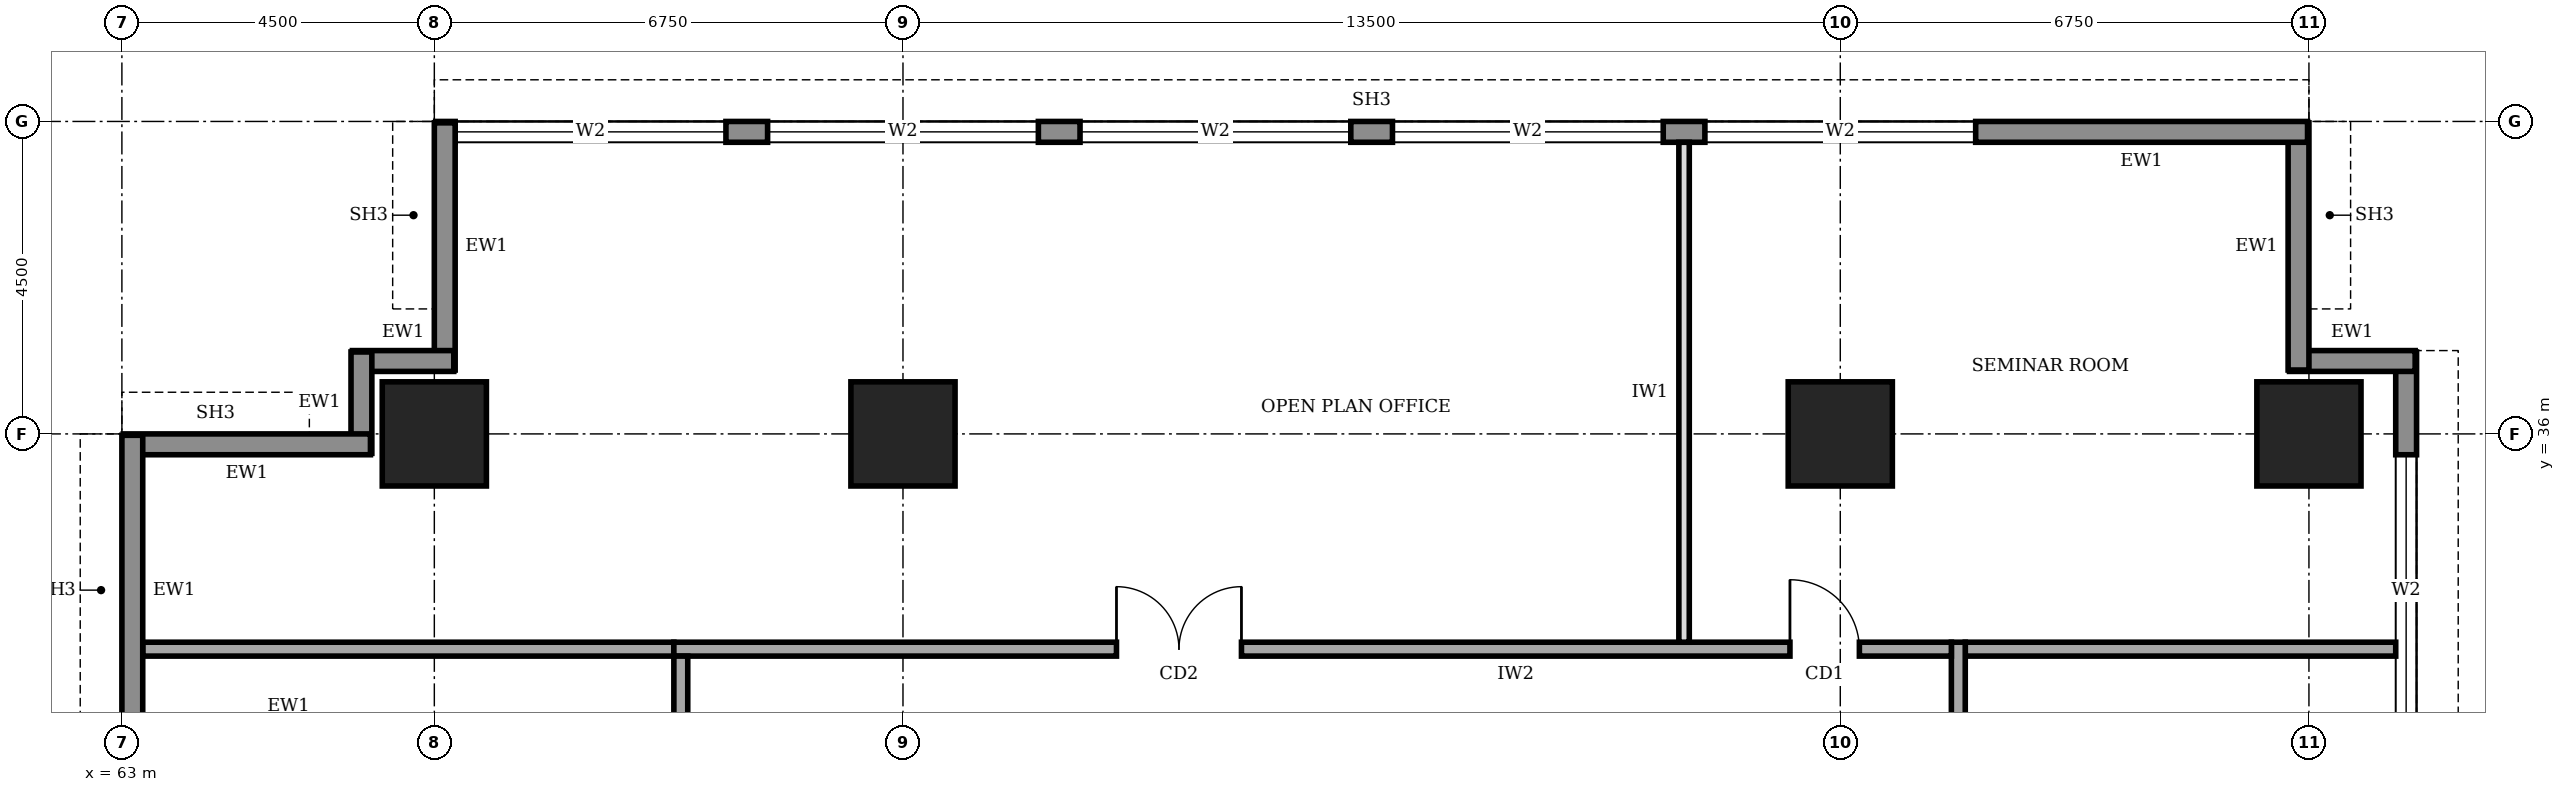
"""IFC4 building model, lengths in metres.
Left out: names, types, materials, properties, quantities, classifications, styles, units other than length and angle.
Written with IfcOpenShell. Run it as: python <this file> out.ifc"""

import sys

from ifc_helpers import new_model, si_unit, direction, frame, frame_2d, origin, origin_2d, place, context, subcontext, project, spatial, rectangle, extrude, element, fill, save


model = new_model("IFC4")
c1 = context("Model", 3, precision=1e-05, world=origin(), true_north=direction((0.0, 1.0)))
c2 = subcontext(c1, "Body", "Model", "MODEL_VIEW")
j1 = project(units=[si_unit("LENGTHUNIT", "METRE"), si_unit("PLANEANGLEUNIT", "RADIAN")], contexts=[c1])
p1 = place(None, origin())
s1 = spatial("IfcSite", under=j1, at=p1, CompositionType="ELEMENT")
p2 = place(p1, origin())
s2 = spatial("IfcBuilding", under=s1, at=p2, CompositionType="ELEMENT")
p3 = place(p2, frame((0.0, 0.0, 137.0)))
s3 = spatial("IfcBuildingStorey", under=s2, at=p3, CompositionType="ELEMENT", Elevation=137.0)
for number, where, z_axis, x_axis in (
    (1, (67.5, 36.0, 0.0), (0.0, 0.0, 1.0), (1.0, 0.0, 0.0)),
    (2, (74.25, 36.0, 0.0), (0.0, 0.0, 1.0), (1.0, 0.0, 0.0)),
    (3, (87.75, 36.0, 0.0), (0.0, 0.0, 1.0), (1.0, 0.0, 0.0)),
    (4, (94.5, 36.0, 0.0), (0.0, 0.0, 1.0), (1.0, 0.0, 0.0)),
):
    element("IfcColumn", number, at=place(p3, frame(where, z_axis=z_axis, x_axis=x_axis)), inside=s3, PredefinedType="COLUMN", context=c2, shape_type="SweptSolid", body=[
        extrude(rectangle(XDim=1.5, YDim=1.5, at=origin_2d()), origin(), (0.0, 0.0, 1.0), 4.0),
    ])
p4 = place(p3, frame((95.9, 3.32, 0.0), z_axis=(0.0, 0.0, 1.0), x_axis=(0.0, 1.0, 0.0)))
e5 = element("IfcWall", 5, at=p4, inside=s3, PredefinedType="STANDARD", context=c2, shape_type="SweptSolid", body=[
    extrude(rectangle(XDim=33.86, YDim=0.3, at=frame_2d((16.93, 0.0))), origin(), (0.0, 0.0, 1.0), 3.75),
])
p5 = place(p4, frame((1.48, 0.0, 0.6)))
e6 = element("IfcOpeningElement", 6, at=p5, cuts=e5, PredefinedType="OPENING", context=c2, shape_type="SweptSolid", body=[
    extrude(rectangle(XDim=3.9, YDim=2.6, at=frame_2d((1.95, 1.3))), frame((0.0, 0.16, 0.0), z_axis=(0.0, -1.0, 0.0), x_axis=(1.0, 0.0, 0.0)), (0.0, 0.0, 1.0), 0.32),
])
p6 = place(p4, frame((5.98, 0.0, 0.6)))
e7 = element("IfcOpeningElement", 7, at=p6, cuts=e5, PredefinedType="OPENING", context=c2, shape_type="SweptSolid", body=[
    extrude(rectangle(XDim=3.9, YDim=2.6, at=frame_2d((1.95, 1.3))), frame((0.0, 0.16, 0.0), z_axis=(0.0, -1.0, 0.0), x_axis=(1.0, 0.0, 0.0)), (0.0, 0.0, 1.0), 0.32),
])
p7 = place(p4, frame((10.48, 0.0, 0.6)))
e8 = element("IfcOpeningElement", 8, at=p7, cuts=e5, PredefinedType="OPENING", context=c2, shape_type="SweptSolid", body=[
    extrude(rectangle(XDim=3.9, YDim=2.6, at=frame_2d((1.95, 1.3))), frame((0.0, 0.16, 0.0), z_axis=(0.0, -1.0, 0.0), x_axis=(1.0, 0.0, 0.0)), (0.0, 0.0, 1.0), 0.32),
])
p8 = place(p4, frame((14.98, 0.0, 0.6)))
e9 = element("IfcOpeningElement", 9, at=p8, cuts=e5, PredefinedType="OPENING", context=c2, shape_type="SweptSolid", body=[
    extrude(rectangle(XDim=3.9, YDim=2.6, at=frame_2d((1.95, 1.3))), frame((0.0, 0.16, 0.0), z_axis=(0.0, -1.0, 0.0), x_axis=(1.0, 0.0, 0.0)), (0.0, 0.0, 1.0), 0.32),
])
p9 = place(p4, frame((19.48, 0.0, 0.6)))
e10 = element("IfcOpeningElement", 10, at=p9, cuts=e5, PredefinedType="OPENING", context=c2, shape_type="SweptSolid", body=[
    extrude(rectangle(XDim=3.9, YDim=2.6, at=frame_2d((1.95, 1.3))), frame((0.0, 0.16, 0.0), z_axis=(0.0, -1.0, 0.0), x_axis=(1.0, 0.0, 0.0)), (0.0, 0.0, 1.0), 0.32),
])
p10 = place(p4, frame((23.98, 0.0, 0.6)))
e11 = element("IfcOpeningElement", 11, at=p10, cuts=e5, PredefinedType="OPENING", context=c2, shape_type="SweptSolid", body=[
    extrude(rectangle(XDim=3.9, YDim=2.6, at=frame_2d((1.95, 1.3))), frame((0.0, 0.16, 0.0), z_axis=(0.0, -1.0, 0.0), x_axis=(1.0, 0.0, 0.0)), (0.0, 0.0, 1.0), 0.32),
])
p11 = place(p4, frame((28.48, 0.0, 0.6)))
e12 = element("IfcOpeningElement", 12, at=p11, cuts=e5, PredefinedType="OPENING", context=c2, shape_type="SweptSolid", body=[
    extrude(rectangle(XDim=3.9, YDim=2.6, at=frame_2d((1.95, 1.3))), frame((0.0, 0.16, 0.0), z_axis=(0.0, -1.0, 0.0), x_axis=(1.0, 0.0, 0.0)), (0.0, 0.0, 1.0), 0.32),
])
p12 = place(p3, frame((96.03, 37.05, 0.0), z_axis=(0.0, 0.0, 1.0), x_axis=(-1.0, 0.0, 0.0)))
e13 = element("IfcWall", 13, at=p12, inside=s3, PredefinedType="STANDARD", context=c2, shape_type="SweptSolid", body=[
    extrude(rectangle(XDim=1.81, YDim=0.3, at=frame_2d((0.905, 0.0))), origin(), (0.0, 0.0, 1.0), 3.75),
])
p13 = place(p3, frame((94.35, 36.92, 0.0), z_axis=(0.0, 0.0, 1.0), x_axis=(0.0, 1.0, 0.0)))
e14 = element("IfcWall", 14, at=p13, inside=s3, PredefinedType="STANDARD", context=c2, shape_type="SweptSolid", body=[
    extrude(rectangle(XDim=3.56, YDim=0.3, at=frame_2d((1.78, 0.0))), origin(), (0.0, 0.0, 1.0), 2.85),
])
p14 = place(p3, frame((94.48, 40.35, 0.0), z_axis=(0.0, 0.0, 1.0), x_axis=(-1.0, 0.0, 0.0)))
e15 = element("IfcWall", 15, at=p14, inside=s3, PredefinedType="STANDARD", context=c2, shape_type="SweptSolid", body=[
    extrude(rectangle(XDim=26.96, YDim=0.3, at=frame_2d((13.48, 0.0))), origin(), (0.0, 0.0, 1.0), 3.75),
])
p15 = place(p14, frame((22.78, 0.0, 0.6)))
e16 = element("IfcOpeningElement", 16, at=p15, cuts=e15, PredefinedType="OPENING", context=c2, shape_type="SweptSolid", body=[
    extrude(rectangle(XDim=3.9, YDim=2.6, at=frame_2d((1.95, 1.3))), frame((0.0, 0.16, 0.0), z_axis=(0.0, -1.0, 0.0), x_axis=(1.0, 0.0, 0.0)), (0.0, 0.0, 1.0), 0.32),
])
p16 = place(p14, frame((18.28, 0.0, 0.6)))
e17 = element("IfcOpeningElement", 17, at=p16, cuts=e15, PredefinedType="OPENING", context=c2, shape_type="SweptSolid", body=[
    extrude(rectangle(XDim=3.9, YDim=2.6, at=frame_2d((1.95, 1.3))), frame((0.0, 0.16, 0.0), z_axis=(0.0, -1.0, 0.0), x_axis=(1.0, 0.0, 0.0)), (0.0, 0.0, 1.0), 0.32),
])
p17 = place(p14, frame((13.78, 0.0, 0.6)))
e18 = element("IfcOpeningElement", 18, at=p17, cuts=e15, PredefinedType="OPENING", context=c2, shape_type="SweptSolid", body=[
    extrude(rectangle(XDim=3.9, YDim=2.6, at=frame_2d((1.95, 1.3))), frame((0.0, 0.16, 0.0), z_axis=(0.0, -1.0, 0.0), x_axis=(1.0, 0.0, 0.0)), (0.0, 0.0, 1.0), 0.32),
])
p18 = place(p14, frame((9.28, 0.0, 0.6)))
e19 = element("IfcOpeningElement", 19, at=p18, cuts=e15, PredefinedType="OPENING", context=c2, shape_type="SweptSolid", body=[
    extrude(rectangle(XDim=3.9, YDim=2.6, at=frame_2d((1.95, 1.3))), frame((0.0, 0.16, 0.0), z_axis=(0.0, -1.0, 0.0), x_axis=(1.0, 0.0, 0.0)), (0.0, 0.0, 1.0), 0.32),
])
p19 = place(p14, frame((4.78, 0.0, 0.6)))
e20 = element("IfcOpeningElement", 20, at=p19, cuts=e15, PredefinedType="OPENING", context=c2, shape_type="SweptSolid", body=[
    extrude(rectangle(XDim=3.9, YDim=2.6, at=frame_2d((1.95, 1.3))), frame((0.0, 0.16, 0.0), z_axis=(0.0, -1.0, 0.0), x_axis=(1.0, 0.0, 0.0)), (0.0, 0.0, 1.0), 0.32),
])
p20 = place(p3, frame((67.65, 40.48, 0.0), z_axis=(0.0, 0.0, 1.0), x_axis=(0.0, -1.0, 0.0)))
e21 = element("IfcWall", 21, at=p20, inside=s3, PredefinedType="STANDARD", context=c2, shape_type="SweptSolid", body=[
    extrude(rectangle(XDim=3.56, YDim=0.3, at=frame_2d((1.78, 0.0))), origin(), (0.0, 0.0, 1.0), 2.85),
])
for number, where, z_axis, x_axis in (
    (22, (67.78, 37.05, 0.0), (0.0, 0.0, 1.0), (-1.0, 0.0, 0.0)),
    (23, (66.45, 37.18, 0.0), (0.0, 0.0, 1.0), (0.0, -1.0, 0.0)),
):
    element("IfcWall", number, at=place(p3, frame(where, z_axis=z_axis, x_axis=x_axis)), inside=s3, PredefinedType="STANDARD", context=c2, shape_type="SweptSolid", body=[
        extrude(rectangle(XDim=1.46, YDim=0.3, at=frame_2d((0.73, 0.0))), origin(), (0.0, 0.0, 1.0), 3.75),
    ])
p21 = place(p3, frame((66.58, 35.85, 0.0), z_axis=(0.0, 0.0, 1.0), x_axis=(-1.0, 0.0, 0.0)))
e24 = element("IfcWall", 24, at=p21, inside=s3, PredefinedType="STANDARD", context=c2, shape_type="SweptSolid", body=[
    extrude(rectangle(XDim=3.56, YDim=0.3, at=frame_2d((1.78, 0.0))), origin(), (0.0, 0.0, 1.0), 2.85),
])
p22 = place(p3, frame((63.15, 35.98, 0.0), z_axis=(0.0, 0.0, 1.0), x_axis=(0.0, -1.0, 0.0)))
e25 = element("IfcWall", 25, at=p22, inside=s3, PredefinedType="STANDARD", context=c2, shape_type="SweptSolid", body=[
    extrude(rectangle(XDim=4.46, YDim=0.3, at=frame_2d((2.23, 0.0))), origin(), (0.0, 0.0, 1.0), 3.75),
])
p23 = place(p3, frame((89.45, 9.2, 0.0), z_axis=(0.0, 0.0, 1.0), x_axis=(0.0, 1.0, 0.0)))
e26 = element("IfcWall", 26, at=p23, inside=s3, PredefinedType="SOLIDWALL", context=c2, shape_type="SweptSolid", body=[
    extrude(rectangle(XDim=23.8, YDim=0.2, at=frame_2d((11.9, 0.0))), origin(), (0.0, 0.0, 1.0), 3.75),
])
p24 = place(p23, frame((1.55, 0.0, 0.0)))
e27 = element("IfcOpeningElement", 27, at=p24, cuts=e26, PredefinedType="OPENING", context=c2, shape_type="SweptSolid", body=[
    extrude(rectangle(XDim=1.0, YDim=2.1, at=frame_2d((0.5, 1.05))), frame((0.0, 0.11, 0.0), z_axis=(0.0, -1.0, 0.0), x_axis=(1.0, 0.0, 0.0)), (0.0, 0.0, 1.0), 0.22),
])
p25 = place(p23, frame((5.05, 0.0, 0.0)))
e28 = element("IfcOpeningElement", 28, at=p25, cuts=e26, PredefinedType="OPENING", context=c2, shape_type="SweptSolid", body=[
    extrude(rectangle(XDim=0.9, YDim=2.1, at=frame_2d((0.45, 1.05))), frame((0.0, 0.11, 0.0), z_axis=(0.0, -1.0, 0.0), x_axis=(1.0, 0.0, 0.0)), (0.0, 0.0, 1.0), 0.22),
])
p26 = place(p23, frame((8.25, 0.0, 0.0)))
e29 = element("IfcOpeningElement", 29, at=p26, cuts=e26, PredefinedType="OPENING", context=c2, shape_type="SweptSolid", body=[
    extrude(rectangle(XDim=0.9, YDim=2.1, at=frame_2d((0.45, 1.05))), frame((0.0, 0.11, 0.0), z_axis=(0.0, -1.0, 0.0), x_axis=(1.0, 0.0, 0.0)), (0.0, 0.0, 1.0), 0.22),
])
p27 = place(p23, frame((13.8, 0.0, 0.0)))
e30 = element("IfcOpeningElement", 30, at=p27, cuts=e26, PredefinedType="OPENING", context=c2, shape_type="SweptSolid", body=[
    extrude(rectangle(XDim=0.9, YDim=2.1, at=frame_2d((0.45, 1.05))), frame((0.0, 0.11, 0.0), z_axis=(0.0, -1.0, 0.0), x_axis=(1.0, 0.0, 0.0)), (0.0, 0.0, 1.0), 0.22),
])
p28 = place(p23, frame((16.3, 0.0, 0.0)))
e31 = element("IfcOpeningElement", 31, at=p28, cuts=e26, PredefinedType="OPENING", context=c2, shape_type="SweptSolid", body=[
    extrude(rectangle(XDim=1.0, YDim=2.1, at=frame_2d((0.5, 1.05))), frame((0.0, 0.11, 0.0), z_axis=(0.0, -1.0, 0.0), x_axis=(1.0, 0.0, 0.0)), (0.0, 0.0, 1.0), 0.22),
])
p29 = place(p23, frame((11.2, 0.0, 0.0)))
e32 = element("IfcOpeningElement", 32, at=p29, cuts=e26, PredefinedType="OPENING", context=c2, shape_type="SweptSolid", body=[
    extrude(rectangle(XDim=1.0, YDim=2.1, at=frame_2d((0.5, 1.05))), frame((0.0, 0.11, 0.0), z_axis=(0.0, -1.0, 0.0), x_axis=(1.0, 0.0, 0.0)), (0.0, 0.0, 1.0), 0.22),
])
p30 = place(p23, frame((20.3, 0.0, 0.0)))
e33 = element("IfcOpeningElement", 33, at=p30, cuts=e26, PredefinedType="OPENING", context=c2, shape_type="SweptSolid", body=[
    extrude(rectangle(XDim=1.0, YDim=2.1, at=frame_2d((0.5, 1.05))), frame((0.0, 0.11, 0.0), z_axis=(0.0, -1.0, 0.0), x_axis=(1.0, 0.0, 0.0)), (0.0, 0.0, 1.0), 0.22),
])
p31 = place(p3, frame((89.35, 32.9, 0.0), z_axis=(0.0, 0.0, 1.0), x_axis=(-1.0, 0.0, 0.0)))
e34 = element("IfcWall", 34, at=p31, inside=s3, PredefinedType="SOLIDWALL", context=c2, shape_type="SweptSolid", body=[
    extrude(rectangle(XDim=18.4, YDim=0.2, at=frame_2d((9.2, 0.0))), origin(), (0.0, 0.0, 1.0), 3.75),
])
p32 = place(p31, frame((10.225, 0.0, 0.0)))
e35 = element("IfcOpeningElement", 35, at=p32, cuts=e34, PredefinedType="OPENING", context=c2, shape_type="SweptSolid", body=[
    extrude(rectangle(XDim=1.8, YDim=2.1, at=frame_2d((0.9, 1.05))), frame((0.0, 0.11, 0.0), z_axis=(0.0, -1.0, 0.0), x_axis=(1.0, 0.0, 0.0)), (0.0, 0.0, 1.0), 0.22),
])
p33 = place(p31, frame((1.325, 0.0, 0.0)))
e36 = element("IfcOpeningElement", 36, at=p33, cuts=e34, PredefinedType="OPENING", context=c2, shape_type="SweptSolid", body=[
    extrude(rectangle(XDim=1.0, YDim=2.1, at=frame_2d((0.5, 1.05))), frame((0.0, 0.11, 0.0), z_axis=(0.0, -1.0, 0.0), x_axis=(1.0, 0.0, 0.0)), (0.0, 0.0, 1.0), 0.22),
])
p34 = place(p3, frame((71.05, 32.8, 0.0), z_axis=(0.0, 0.0, 1.0), x_axis=(0.0, -1.0, 0.0)))
e37 = element("IfcWall", 37, at=p34, inside=s3, PredefinedType="SOLIDWALL", context=c2, shape_type="SweptSolid", body=[
    extrude(rectangle(XDim=23.8, YDim=0.2, at=frame_2d((11.9, 0.0))), origin(), (0.0, 0.0, 1.0), 3.75),
])
p35 = place(p34, frame((18.8, 0.0, 0.0)))
e38 = element("IfcOpeningElement", 38, at=p35, cuts=e37, PredefinedType="OPENING", context=c2, shape_type="SweptSolid", body=[
    extrude(rectangle(XDim=1.0, YDim=2.1, at=frame_2d((0.5, 1.05))), frame((0.0, 0.11, 0.0), z_axis=(0.0, -1.0, 0.0), x_axis=(1.0, 0.0, 0.0)), (0.0, 0.0, 1.0), 0.22),
])
p36 = place(p34, frame((9.8, 0.0, 0.0)))
e39 = element("IfcOpeningElement", 39, at=p36, cuts=e37, PredefinedType="OPENING", context=c2, shape_type="SweptSolid", body=[
    extrude(rectangle(XDim=1.0, YDim=2.1, at=frame_2d((0.5, 1.05))), frame((0.0, 0.11, 0.0), z_axis=(0.0, -1.0, 0.0), x_axis=(1.0, 0.0, 0.0)), (0.0, 0.0, 1.0), 0.22),
])
p37 = place(p34, frame((2.3, 0.0, 0.0)))
e40 = element("IfcOpeningElement", 40, at=p37, cuts=e37, PredefinedType="OPENING", context=c2, shape_type="SweptSolid", body=[
    extrude(rectangle(XDim=1.0, YDim=2.1, at=frame_2d((0.5, 1.05))), frame((0.0, 0.11, 0.0), z_axis=(0.0, -1.0, 0.0), x_axis=(1.0, 0.0, 0.0)), (0.0, 0.0, 1.0), 0.22),
])
p38 = place(p3, frame((63.3, 32.9, 0.0), z_axis=(0.0, 0.0, 1.0), x_axis=(1.0, 0.0, 0.0)))
e41 = element("IfcWall", 41, at=p38, inside=s3, PredefinedType="SOLIDWALL", context=c2, shape_type="SweptSolid", body=[
    extrude(rectangle(XDim=7.65, YDim=0.2, at=frame_2d((3.825, 0.0))), origin(), (0.0, 0.0, 1.0), 3.75),
])
p39 = place(p3, frame((89.55, 32.9, 0.0), z_axis=(0.0, 0.0, 1.0), x_axis=(1.0, 0.0, 0.0)))
e42 = element("IfcWall", 42, at=p39, inside=s3, PredefinedType="SOLIDWALL", context=c2, shape_type="SweptSolid", body=[
    extrude(rectangle(XDim=6.2, YDim=0.2, at=frame_2d((3.1, 0.0))), origin(), (0.0, 0.0, 1.0), 3.75),
])
p40 = place(p3, frame((85.5, 33.0, 0.0), z_axis=(0.0, 0.0, 1.0), x_axis=(0.0, 1.0, 0.0)))
e43 = element("IfcWall", 43, at=p40, inside=s3, PredefinedType="PARTITIONING", context=c2, shape_type="SweptSolid", body=[
    extrude(rectangle(XDim=7.2, YDim=0.15, at=frame_2d((3.6, 0.0))), origin(), (0.0, 0.0, 1.0), 3.75),
])
p41 = place(p11, origin())
e44 = element("IfcWindow", 44, at=p41, inside=s3, PartitioningType="SINGLE_PANEL", PredefinedType="WINDOW", context=c2, shape_type="SweptSolid", body=[
    extrude(rectangle(XDim=3.9, YDim=2.6, at=frame_2d((1.95, 1.3))), frame((0.0, 0.03, 0.0), z_axis=(0.0, -1.0, 0.0), x_axis=(1.0, 0.0, 0.0)), (0.0, 0.0, 1.0), 0.06),
])
fill(e12, e44)
p42 = place(p15, origin())
e45 = element("IfcWindow", 45, at=p42, inside=s3, PartitioningType="SINGLE_PANEL", PredefinedType="WINDOW", context=c2, shape_type="SweptSolid", body=[
    extrude(rectangle(XDim=3.9, YDim=2.6, at=frame_2d((1.95, 1.3))), frame((0.0, 0.03, 0.0), z_axis=(0.0, -1.0, 0.0), x_axis=(1.0, 0.0, 0.0)), (0.0, 0.0, 1.0), 0.06),
])
fill(e16, e45)
p43 = place(p16, origin())
e46 = element("IfcWindow", 46, at=p43, inside=s3, PartitioningType="SINGLE_PANEL", PredefinedType="WINDOW", context=c2, shape_type="SweptSolid", body=[
    extrude(rectangle(XDim=3.9, YDim=2.6, at=frame_2d((1.95, 1.3))), frame((0.0, 0.03, 0.0), z_axis=(0.0, -1.0, 0.0), x_axis=(1.0, 0.0, 0.0)), (0.0, 0.0, 1.0), 0.06),
])
fill(e17, e46)
p44 = place(p17, origin())
e47 = element("IfcWindow", 47, at=p44, inside=s3, PartitioningType="SINGLE_PANEL", PredefinedType="WINDOW", context=c2, shape_type="SweptSolid", body=[
    extrude(rectangle(XDim=3.9, YDim=2.6, at=frame_2d((1.95, 1.3))), frame((0.0, 0.03, 0.0), z_axis=(0.0, -1.0, 0.0), x_axis=(1.0, 0.0, 0.0)), (0.0, 0.0, 1.0), 0.06),
])
fill(e18, e47)
p45 = place(p18, origin())
e48 = element("IfcWindow", 48, at=p45, inside=s3, PartitioningType="SINGLE_PANEL", PredefinedType="WINDOW", context=c2, shape_type="SweptSolid", body=[
    extrude(rectangle(XDim=3.9, YDim=2.6, at=frame_2d((1.95, 1.3))), frame((0.0, 0.03, 0.0), z_axis=(0.0, -1.0, 0.0), x_axis=(1.0, 0.0, 0.0)), (0.0, 0.0, 1.0), 0.06),
])
fill(e19, e48)
p46 = place(p19, origin())
e49 = element("IfcWindow", 49, at=p46, inside=s3, PartitioningType="SINGLE_PANEL", PredefinedType="WINDOW", context=c2, shape_type="SweptSolid", body=[
    extrude(rectangle(XDim=3.9, YDim=2.6, at=frame_2d((1.95, 1.3))), frame((0.0, 0.03, 0.0), z_axis=(0.0, -1.0, 0.0), x_axis=(1.0, 0.0, 0.0)), (0.0, 0.0, 1.0), 0.06),
])
fill(e20, e49)
p47 = place(p32, frame((1.8, 0.0, 0.0), z_axis=(0.0, 0.0, 1.0), x_axis=(-1.0, 0.0, 0.0)))
e50 = element("IfcDoor", 50, at=p47, inside=s3, OperationType="DOUBLE_DOOR_SINGLE_SWING", PredefinedType="DOOR", context=c2, shape_type="SweptSolid", body=[
    extrude(rectangle(XDim=1.8, YDim=2.1, at=frame_2d((0.9, 1.05))), frame((0.0, 0.025, 0.0), z_axis=(0.0, -1.0, 0.0), x_axis=(1.0, 0.0, 0.0)), (0.0, 0.0, 1.0), 0.05),
])
fill(e35, e50)
p48 = place(p33, frame((1.0, 0.0, 0.0), z_axis=(0.0, 0.0, 1.0), x_axis=(-1.0, 0.0, 0.0)))
e51 = element("IfcDoor", 51, at=p48, inside=s3, OperationType="SINGLE_SWING_LEFT", PredefinedType="DOOR", context=c2, shape_type="SweptSolid", body=[
    extrude(rectangle(XDim=1.0, YDim=2.1, at=frame_2d((0.5, 1.05))), frame((0.0, 0.025, 0.0), z_axis=(0.0, -1.0, 0.0), x_axis=(1.0, 0.0, 0.0)), (0.0, 0.0, 1.0), 0.05),
])
fill(e36, e51)
save(model, sys.argv[1])
